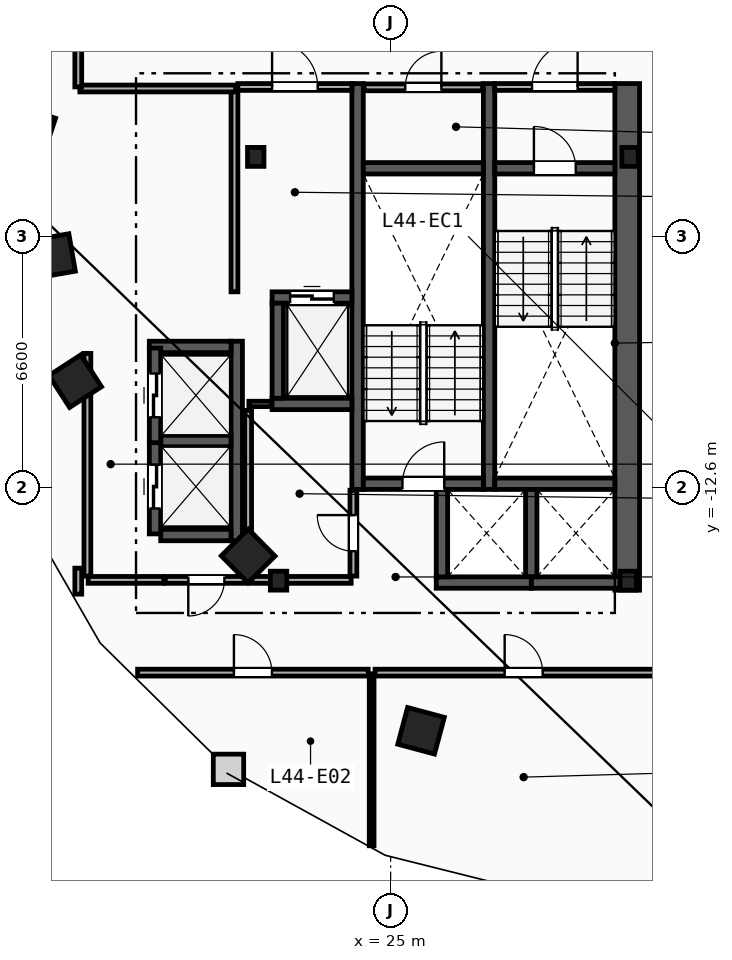
"""IFC4 building model, lengths in metres.
Left out: names, types, materials, properties, quantities, classifications, styles, units other than length and angle.
Written with IfcOpenShell. Run it as: python <this file> out.ifc"""

import sys

from ifc_helpers import new_model, si_unit, direction, frame, frame_2d, origin, origin_2d, place, context, subcontext, project, spatial, rectangle, i_section, extrude, element, fill, save


model = new_model("IFC4")
c1 = context("Model", 3, precision=1e-05, world=origin(), true_north=direction((0.0, 1.0)))
c2 = subcontext(c1, "Body", "Model", "MODEL_VIEW")
j1 = project(units=[si_unit("LENGTHUNIT", "METRE"), si_unit("PLANEANGLEUNIT", "RADIAN")], contexts=[c1])
p1 = place(None, origin())
s1 = spatial("IfcSite", under=j1, at=p1, CompositionType="ELEMENT")
p2 = place(p1, origin())
s2 = spatial("IfcBuilding", under=s1, at=p2, CompositionType="ELEMENT")
p3 = place(p2, frame((0.0, 0.0, 169.2)))
s3 = spatial("IfcBuildingStorey", under=s2, at=p3, CompositionType="ELEMENT", Elevation=169.2)
for number, where, z_axis, x_axis in (
    (1, (31.3, -3.9, 0.0), (0.0, 0.0, 1.0), (1.0, 0.0, 0.0)),
    (2, (21.45, -3.9, 0.0), (0.0, 0.0, 1.0), (1.0, 0.0, 0.0)),
    (3, (22.05, -15.05, 0.0), (0.0, 0.0, 1.0), (1.0, 0.0, 0.0)),
    (4, (31.25, -15.05, 0.0), (0.0, 0.0, 1.0), (1.0, 0.0, 0.0)),
):
    element("IfcColumn", number, at=place(p3, frame(where, z_axis=z_axis, x_axis=x_axis)), inside=s3, PredefinedType="COLUMN", context=c2, shape_type="SweptSolid", body=[
        extrude(i_section(OverallWidth=0.432, OverallDepth=0.498, WebThickness=0.056, FlangeThickness=0.089, FilletRadius=0.018, at=origin_2d()), origin(), (0.0, 0.0, 1.0), 3.6),
    ])
for number, where, z_axis, x_axis in (
    (5, (15.55, -3.2, 0.0), (0.0, 0.0, 1.0), (-0.315, -0.949, 0.0)),
    (6, (16.125, -6.5, 0.0), (0.0, 0.0, 1.0), (0.172, -0.985, 0.0)),
    (7, (16.7, -9.8, 0.0), (0.0, 0.0, 1.0), (0.544, -0.839, 0.0)),
    (8, (21.25, -14.4, 0.0), (0.0, 0.0, 1.0), (0.703, -0.711, 0.0)),
    (9, (25.8, -19.0, 0.0), (0.0, 0.0, 1.0), (0.966, -0.259, 0.0)),
):
    element("IfcColumn", number, at=place(p3, frame(where, z_axis=z_axis, x_axis=x_axis)), inside=s3, PredefinedType="COLUMN", context=c2, shape_type="SweptSolid", body=[
        extrude(rectangle(XDim=1.0, YDim=1.0, at=origin_2d()), origin(), (0.0, 0.0, 1.0), 3.6),
    ])
p4 = place(p3, frame((31.225, -15.3, 0.0), z_axis=(0.0, 0.0, 1.0), x_axis=(0.0, 1.0, 0.0)))
e10 = element("IfcWall", 10, at=p4, inside=s3, PredefinedType="SHEAR", context=c2, shape_type="SweptSolid", body=[
    extrude(rectangle(XDim=13.33, YDim=0.65, at=frame_2d((6.665, 0.0))), origin(), (0.0, 0.0, 1.0), 3.36),
])
for number, where, z_axis, x_axis in (
    (11, (27.59, -12.65, 0.0), (0.0, 0.0, 1.0), (0.0, 1.0, 0.0)),
    (12, (24.13, -12.65, 0.0), (0.0, 0.0, 1.0), (0.0, 1.0, 0.0)),
):
    element("IfcWall", number, at=place(p3, frame(where, z_axis=z_axis, x_axis=x_axis)), inside=s3, PredefinedType="SHEAR", context=c2, shape_type="SweptSolid", body=[
        extrude(rectangle(XDim=10.68, YDim=0.3, at=frame_2d((5.34, 0.0))), origin(), (0.0, 0.0, 1.0), 3.36),
    ])
p5 = place(p3, frame((27.74, -4.2, 0.0), z_axis=(0.0, 0.0, 1.0), x_axis=(1.0, 0.0, 0.0)))
e13 = element("IfcWall", 13, at=p5, inside=s3, PredefinedType="SHEAR", context=c2, shape_type="SweptSolid", body=[
    extrude(rectangle(XDim=3.16, YDim=0.3, at=frame_2d((1.58, 0.0))), origin(), (0.0, 0.0, 1.0), 3.36),
])
p6 = place(p5, frame((1.03, 0.0, 0.0)))
e14 = element("IfcOpeningElement", 14, at=p6, cuts=e13, PredefinedType="OPENING", context=c2, shape_type="SweptSolid", body=[
    extrude(rectangle(XDim=1.1, YDim=2.15, at=frame_2d((0.55, 1.075))), frame((0.0, 0.16, 0.0), z_axis=(0.0, -1.0, 0.0), x_axis=(1.0, 0.0, 0.0)), (0.0, 0.0, 1.0), 0.32),
])
p7 = place(p3, frame((27.74, -12.5, 0.0), z_axis=(0.0, 0.0, 1.0), x_axis=(1.0, 0.0, 0.0)))
e15 = element("IfcWall", 15, at=p7, inside=s3, PredefinedType="SHEAR", context=c2, shape_type="SweptSolid", body=[
    extrude(rectangle(XDim=3.16, YDim=0.3, at=frame_2d((1.58, 0.0))), origin(), (0.0, 0.0, 1.0), 3.36),
])
p8 = place(p3, frame((24.28, -12.5, 0.0), z_axis=(0.0, 0.0, 1.0), x_axis=(1.0, 0.0, 0.0)))
e16 = element("IfcWall", 16, at=p8, inside=s3, PredefinedType="SHEAR", context=c2, shape_type="SweptSolid", body=[
    extrude(rectangle(XDim=3.16, YDim=0.3, at=frame_2d((1.58, 0.0))), origin(), (0.0, 0.0, 1.0), 3.36),
])
p9 = place(p8, frame((1.03, 0.0, 0.0)))
e17 = element("IfcOpeningElement", 17, at=p9, cuts=e16, PredefinedType="OPENING", context=c2, shape_type="SweptSolid", body=[
    extrude(rectangle(XDim=1.1, YDim=2.15, at=frame_2d((0.55, 1.075))), frame((0.0, 0.16, 0.0), z_axis=(0.0, -1.0, 0.0), x_axis=(1.0, 0.0, 0.0)), (0.0, 0.0, 1.0), 0.32),
])
p10 = place(p3, frame((24.28, -4.2, 0.0), z_axis=(0.0, 0.0, 1.0), x_axis=(1.0, 0.0, 0.0)))
e18 = element("IfcWall", 18, at=p10, inside=s3, PredefinedType="SHEAR", context=c2, shape_type="SweptSolid", body=[
    extrude(rectangle(XDim=3.16, YDim=0.3, at=frame_2d((1.58, 0.0))), origin(), (0.0, 0.0, 1.0), 3.36),
])
p11 = place(p3, frame((20.89, -7.45, 0.0), z_axis=(0.0, 0.0, 1.0), x_axis=(0.0, 1.0, 0.0)))
e19 = element("IfcWall", 19, at=p11, inside=s3, PredefinedType="PARTITIONING", context=c2, shape_type="SweptSolid", body=[
    extrude(rectangle(XDim=5.3, YDim=0.18, at=frame_2d((2.65, 0.0))), origin(), (0.0, 0.0, 1.0), 3.36),
])
p12 = place(p3, frame((20.98, -2.06, 0.0), z_axis=(0.0, 0.0, 1.0), x_axis=(1.0, 0.0, 0.0)))
e20 = element("IfcWall", 20, at=p12, inside=s3, PredefinedType="PARTITIONING", context=c2, shape_type="SweptSolid", body=[
    extrude(rectangle(XDim=3.0, YDim=0.18, at=frame_2d((1.5, 0.0))), origin(), (0.0, 0.0, 1.0), 3.36),
])
p13 = place(p12, frame((0.9, 0.0, 0.0)))
e21 = element("IfcOpeningElement", 21, at=p13, cuts=e20, PredefinedType="OPENING", context=c2, shape_type="SweptSolid", body=[
    extrude(rectangle(XDim=1.2, YDim=2.15, at=frame_2d((0.6, 1.075))), frame((0.0, 0.1, 0.0), z_axis=(0.0, -1.0, 0.0), x_axis=(1.0, 0.0, 0.0)), (0.0, 0.0, 1.0), 0.2),
])
p14 = place(p3, frame((27.74, -2.06, 0.0), z_axis=(0.0, 0.0, 1.0), x_axis=(1.0, 0.0, 0.0)))
e22 = element("IfcWall", 22, at=p14, inside=s3, PredefinedType="PARTITIONING", context=c2, shape_type="SweptSolid", body=[
    extrude(rectangle(XDim=3.16, YDim=0.18, at=frame_2d((1.58, 0.0))), origin(), (0.0, 0.0, 1.0), 3.36),
])
p15 = place(p14, frame((0.98, 0.0, 0.0)))
e23 = element("IfcOpeningElement", 23, at=p15, cuts=e22, PredefinedType="OPENING", context=c2, shape_type="SweptSolid", body=[
    extrude(rectangle(XDim=1.2, YDim=2.15, at=frame_2d((0.6, 1.075))), frame((0.0, 0.1, 0.0), z_axis=(0.0, -1.0, 0.0), x_axis=(1.0, 0.0, 0.0)), (0.0, 0.0, 1.0), 0.2),
])
p16 = place(p3, frame((21.88, -7.6, 0.0), z_axis=(0.0, 0.0, 1.0), x_axis=(1.0, 0.0, 0.0)))
e24 = element("IfcWall", 24, at=p16, inside=s3, PredefinedType="SHEAR", context=c2, shape_type="SweptSolid", body=[
    extrude(rectangle(XDim=2.1, YDim=0.3, at=frame_2d((1.05, 0.0))), origin(), (0.0, 0.0, 1.0), 3.36),
])
p17 = place(p16, frame((0.475, 0.0, 0.0)))
e25 = element("IfcOpeningElement", 25, at=p17, cuts=e24, PredefinedType="OPENING", context=c2, shape_type="SweptSolid", body=[
    extrude(rectangle(XDim=1.15, YDim=2.2, at=frame_2d((0.575, 1.1))), frame((0.0, 0.16, 0.0), z_axis=(0.0, -1.0, 0.0), x_axis=(1.0, 0.0, 0.0)), (0.0, 0.0, 1.0), 0.32),
])
p18 = place(p3, frame((21.88, -10.4, 0.0), z_axis=(0.0, 0.0, 1.0), x_axis=(1.0, 0.0, 0.0)))
e26 = element("IfcWall", 26, at=p18, inside=s3, PredefinedType="SHEAR", context=c2, shape_type="SweptSolid", body=[
    extrude(rectangle(XDim=2.1, YDim=0.3, at=frame_2d((1.05, 0.0))), origin(), (0.0, 0.0, 1.0), 3.36),
])
for number, where, z_axis, x_axis in (
    (27, (22.03, -10.25, 0.0), (0.0, 0.0, 1.0), (0.0, 1.0, 0.0)),
    (28, (28.7, -15.1, 0.0), (0.0, 0.0, 1.0), (1.0, 0.0, 0.0)),
):
    element("IfcWall", number, at=place(p3, frame(where, z_axis=z_axis, x_axis=x_axis)), inside=s3, PredefinedType="SHEAR", context=c2, shape_type="SweptSolid", body=[
        extrude(rectangle(XDim=2.5, YDim=0.3, at=frame_2d((1.25, 0.0))), origin(), (0.0, 0.0, 1.0), 3.36),
    ])
p19 = place(p3, frame((28.7, -14.95, 0.0), z_axis=(0.0, 0.0, 1.0), x_axis=(0.0, 1.0, 0.0)))
e29 = element("IfcWall", 29, at=p19, inside=s3, PredefinedType="SHEAR", context=c2, shape_type="SweptSolid", body=[
    extrude(rectangle(XDim=2.3, YDim=0.3, at=frame_2d((1.15, 0.0))), origin(), (0.0, 0.0, 1.0), 3.36),
])
p20 = place(p3, frame((26.2, -15.1, 0.0), z_axis=(0.0, 0.0, 1.0), x_axis=(1.0, 0.0, 0.0)))
e30 = element("IfcWall", 30, at=p20, inside=s3, PredefinedType="SHEAR", context=c2, shape_type="SweptSolid", body=[
    extrude(rectangle(XDim=2.5, YDim=0.3, at=frame_2d((1.25, 0.0))), origin(), (0.0, 0.0, 1.0), 3.36),
])
p21 = place(p3, frame((26.35, -14.95, 0.0), z_axis=(0.0, 0.0, 1.0), x_axis=(0.0, 1.0, 0.0)))
e31 = element("IfcWall", 31, at=p21, inside=s3, PredefinedType="SHEAR", context=c2, shape_type="SweptSolid", body=[
    extrude(rectangle(XDim=2.3, YDim=0.3, at=frame_2d((1.15, 0.0))), origin(), (0.0, 0.0, 1.0), 3.36),
])
p22 = place(p3, frame((20.95, -14.0, 0.0), z_axis=(0.0, 0.0, 1.0), x_axis=(0.0, 1.0, 0.0)))
e32 = element("IfcWall", 32, at=p22, inside=s3, PredefinedType="SHEAR", context=c2, shape_type="SweptSolid", body=[
    extrude(rectangle(XDim=5.25, YDim=0.3, at=frame_2d((2.625, 0.0))), origin(), (0.0, 0.0, 1.0), 3.36),
])
p23 = place(p3, frame((18.95, -13.85, 0.0), z_axis=(0.0, 0.0, 1.0), x_axis=(1.0, 0.0, 0.0)))
e33 = element("IfcWall", 33, at=p23, inside=s3, PredefinedType="SHEAR", context=c2, shape_type="SweptSolid", body=[
    extrude(rectangle(XDim=1.85, YDim=0.3, at=frame_2d((0.925, 0.0))), origin(), (0.0, 0.0, 1.0), 3.36),
])
p24 = place(p3, frame((18.65, -8.9, 0.0), z_axis=(0.0, 0.0, 1.0), x_axis=(1.0, 0.0, 0.0)))
e34 = element("IfcWall", 34, at=p24, inside=s3, PredefinedType="SHEAR", context=c2, shape_type="SweptSolid", body=[
    extrude(rectangle(XDim=2.15, YDim=0.3, at=frame_2d((1.075, 0.0))), origin(), (0.0, 0.0, 1.0), 3.36),
])
p25 = place(p3, frame((18.95, -11.375, 0.0), z_axis=(0.0, 0.0, 1.0), x_axis=(1.0, 0.0, 0.0)))
e35 = element("IfcWall", 35, at=p25, inside=s3, PredefinedType="SHEAR", context=c2, shape_type="SweptSolid", body=[
    extrude(rectangle(XDim=1.85, YDim=0.3, at=frame_2d((0.925, 0.0))), origin(), (0.0, 0.0, 1.0), 3.36),
])
p26 = place(p3, frame((18.8, -13.82, 0.0), z_axis=(0.0, 0.0, 1.0), x_axis=(0.0, 1.0, 0.0)))
e36 = element("IfcWall", 36, at=p26, inside=s3, PredefinedType="SHEAR", context=c2, shape_type="SweptSolid", body=[
    extrude(rectangle(XDim=2.49, YDim=0.3, at=frame_2d((1.245, 0.0))), origin(), (0.0, 0.0, 1.0), 3.36),
])
p27 = place(p26, frame((0.67, 0.0, 0.0)))
e37 = element("IfcOpeningElement", 37, at=p27, cuts=e36, PredefinedType="OPENING", context=c2, shape_type="SweptSolid", body=[
    extrude(rectangle(XDim=1.15, YDim=2.2, at=frame_2d((0.575, 1.1))), frame((0.0, 0.16, 0.0), z_axis=(0.0, -1.0, 0.0), x_axis=(1.0, 0.0, 0.0)), (0.0, 0.0, 1.0), 0.32),
])
p28 = place(p3, frame((18.8, -11.42, 0.0), z_axis=(0.0, 0.0, 1.0), x_axis=(0.0, 1.0, 0.0)))
e38 = element("IfcWall", 38, at=p28, inside=s3, PredefinedType="SHEAR", context=c2, shape_type="SweptSolid", body=[
    extrude(rectangle(XDim=2.49, YDim=0.3, at=frame_2d((1.245, 0.0))), origin(), (0.0, 0.0, 1.0), 3.36),
])
p29 = place(p28, frame((0.67, 0.0, 0.0)))
e39 = element("IfcOpeningElement", 39, at=p29, cuts=e38, PredefinedType="OPENING", context=c2, shape_type="SweptSolid", body=[
    extrude(rectangle(XDim=1.15, YDim=2.2, at=frame_2d((0.575, 1.1))), frame((0.0, 0.16, 0.0), z_axis=(0.0, -1.0, 0.0), x_axis=(1.0, 0.0, 0.0)), (0.0, 0.0, 1.0), 0.32),
])
p30 = place(p3, frame((17.02, -14.93, 0.0), z_axis=(0.0, 0.0, 1.0), x_axis=(0.0, 1.0, 0.0)))
e40 = element("IfcWall", 40, at=p30, inside=s3, PredefinedType="PARTITIONING", context=c2, shape_type="SweptSolid", body=[
    extrude(rectangle(XDim=5.86, YDim=0.18, at=frame_2d((2.93, 0.0))), origin(), (0.0, 0.0, 1.0), 3.36),
])
p31 = place(p3, frame((17.04, -15.03, 0.0), z_axis=(0.0, 0.0, 1.0), x_axis=(1.0, 0.0, 0.0)))
e41 = element("IfcWall", 41, at=p31, inside=s3, PredefinedType="PARTITIONING", context=c2, shape_type="SweptSolid", body=[
    extrude(rectangle(XDim=1.99, YDim=0.18, at=frame_2d((0.995, 0.0))), origin(), (0.0, 0.0, 1.0), 3.36),
])
p32 = place(p3, frame((21.23, -15.03, 0.0), z_axis=(0.0, 0.0, 1.0), x_axis=(-1.0, 0.0, 0.0)))
e42 = element("IfcWall", 42, at=p32, inside=s3, PredefinedType="PARTITIONING", context=c2, shape_type="SweptSolid", body=[
    extrude(rectangle(XDim=2.16, YDim=0.18, at=frame_2d((1.08, 0.0))), origin(), (0.0, 0.0, 1.0), 3.36),
])
p33 = place(p32, frame((0.605, 0.0, 0.0)))
e43 = element("IfcOpeningElement", 43, at=p33, cuts=e42, PredefinedType="OPENING", context=c2, shape_type="SweptSolid", body=[
    extrude(rectangle(XDim=0.95, YDim=2.1, at=frame_2d((0.475, 1.05))), frame((0.0, 0.1, 0.0), z_axis=(0.0, -1.0, 0.0), x_axis=(1.0, 0.0, 0.0)), (0.0, 0.0, 1.0), 0.2),
])
p34 = place(p3, frame((21.27, -10.4, 0.0), z_axis=(0.0, 0.0, 1.0), x_axis=(1.0, 0.0, 0.0)))
e44 = element("IfcWall", 44, at=p34, inside=s3, PredefinedType="PARTITIONING", context=c2, shape_type="SweptSolid", body=[
    extrude(rectangle(XDim=0.59, YDim=0.14, at=frame_2d((0.295, 0.0))), origin(), (0.0, 0.0, 1.0), 3.36),
])
p35 = place(p3, frame((21.25, -14.93, 0.0), z_axis=(0.0, 0.0, 1.0), x_axis=(0.0, 1.0, 0.0)))
e45 = element("IfcWall", 45, at=p35, inside=s3, PredefinedType="PARTITIONING", context=c2, shape_type="SweptSolid", body=[
    extrude(rectangle(XDim=4.36, YDim=0.18, at=frame_2d((2.18, 0.0))), origin(), (0.0, 0.0, 1.0), 3.36),
])
p36 = place(p3, frame((21.35, -15.03, 0.0), z_axis=(0.0, 0.0, 1.0), x_axis=(1.0, 0.0, 0.0)))
e46 = element("IfcWall", 46, at=p36, inside=s3, PredefinedType="PARTITIONING", context=c2, shape_type="SweptSolid", body=[
    extrude(rectangle(XDim=2.61, YDim=0.18, at=frame_2d((1.305, 0.0))), origin(), (0.0, 0.0, 1.0), 2.433),
])
p37 = place(p3, frame((24.3, -2.07, 0.0), z_axis=(0.0, 0.0, 1.0), x_axis=(1.0, 0.0, 0.0)))
e47 = element("IfcWall", 47, at=p37, inside=s3, PredefinedType="PARTITIONING", context=c2, shape_type="SweptSolid", body=[
    extrude(rectangle(XDim=3.12, YDim=0.18, at=frame_2d((1.56, 0.0))), origin(), (0.0, 0.0, 1.0), 3.36),
])
p38 = place(p37, frame((1.085, 0.0, 0.0)))
e48 = element("IfcOpeningElement", 48, at=p38, cuts=e47, PredefinedType="OPENING", context=c2, shape_type="SweptSolid", body=[
    extrude(rectangle(XDim=0.95, YDim=2.1, at=frame_2d((0.475, 1.05))), frame((0.0, 0.1, 0.0), z_axis=(0.0, -1.0, 0.0), x_axis=(1.0, 0.0, 0.0)), (0.0, 0.0, 1.0), 0.2),
])
p39 = place(p3, frame((24.02, -14.93, 0.0), z_axis=(0.0, 0.0, 1.0), x_axis=(0.0, 1.0, 0.0)))
e49 = element("IfcWall", 49, at=p39, inside=s3, PredefinedType="PARTITIONING", context=c2, shape_type="SweptSolid", body=[
    extrude(rectangle(XDim=2.26, YDim=0.18, at=frame_2d((1.13, 0.0))), origin(), (0.0, 0.0, 1.0), 3.36),
])
p40 = place(p39, frame((0.655, 0.0, 0.0)))
e50 = element("IfcOpeningElement", 50, at=p40, cuts=e49, PredefinedType="OPENING", context=c2, shape_type="SweptSolid", body=[
    extrude(rectangle(XDim=0.95, YDim=2.1, at=frame_2d((0.475, 1.05))), frame((0.0, 0.1, 0.0), z_axis=(0.0, -1.0, 0.0), x_axis=(1.0, 0.0, 0.0)), (0.0, 0.0, 1.0), 0.2),
])
p41 = place(p3, frame((24.5, -22.025, 0.0), z_axis=(0.0, 0.0, 1.0), x_axis=(0.0, 1.0, 0.0)))
e51 = element("IfcWall", 51, at=p41, inside=s3, PredefinedType="PARTITIONING", context=c2, shape_type="SweptSolid", body=[
    extrude(rectangle(XDim=4.525, YDim=0.125, at=frame_2d((2.263, 0.0))), origin(), (0.0, 0.0, 1.0), 3.36),
])
p42 = place(p3, frame((24.59, -17.47, 0.0), z_axis=(0.0, 0.0, 1.0), x_axis=(1.0, 0.0, 0.0)))
e52 = element("IfcWall", 52, at=p42, inside=s3, PredefinedType="PARTITIONING", context=c2, shape_type="SweptSolid", body=[
    extrude(rectangle(XDim=7.82, YDim=0.18, at=frame_2d((3.91, 0.0))), origin(), (0.0, 0.0, 1.0), 3.36),
])
p43 = place(p42, frame((3.41, 0.0, 0.0)))
e53 = element("IfcOpeningElement", 53, at=p43, cuts=e52, PredefinedType="OPENING", context=c2, shape_type="SweptSolid", body=[
    extrude(rectangle(XDim=1.0, YDim=2.15, at=frame_2d((0.5, 1.075))), frame((0.0, 0.1, 0.0), z_axis=(0.0, -1.0, 0.0), x_axis=(1.0, 0.0, 0.0)), (0.0, 0.0, 1.0), 0.2),
])
p44 = place(p3, frame((18.342, -17.47, 0.0), z_axis=(0.0, 0.0, 1.0), x_axis=(1.0, 0.0, 0.0)))
e54 = element("IfcWall", 54, at=p44, inside=s3, PredefinedType="PARTITIONING", context=c2, shape_type="SweptSolid", body=[
    extrude(rectangle(XDim=6.068, YDim=0.18, at=frame_2d((3.034, 0.0))), origin(), (0.0, 0.0, 1.0), 3.36),
])
p45 = place(p44, frame((2.534, 0.0, 0.0)))
e55 = element("IfcOpeningElement", 55, at=p45, cuts=e54, PredefinedType="OPENING", context=c2, shape_type="SweptSolid", body=[
    extrude(rectangle(XDim=1.0, YDim=2.15, at=frame_2d((0.5, 1.075))), frame((0.0, 0.1, 0.0), z_axis=(0.0, -1.0, 0.0), x_axis=(1.0, 0.0, 0.0)), (0.0, 0.0, 1.0), 0.2),
])
p46 = place(p3, frame((16.822, -2.1, 0.0), z_axis=(0.0, 0.0, 1.0), x_axis=(1.0, 0.0, 0.0)))
e56 = element("IfcWall", 56, at=p46, inside=s3, PredefinedType="PARTITIONING", context=c2, shape_type="SweptSolid", body=[
    extrude(rectangle(XDim=4.098, YDim=0.18, at=frame_2d((2.049, 0.0))), origin(), (0.0, 0.0, 1.0), 3.36),
])
p47 = place(p3, frame((16.78, 0.329, 0.0), z_axis=(0.0, 0.0, 1.0), x_axis=(0.0, -1.0, 0.0)))
e57 = element("IfcWall", 57, at=p47, inside=s3, PredefinedType="PARTITIONING", context=c2, shape_type="SweptSolid", body=[
    extrude(rectangle(XDim=2.387, YDim=0.18, at=frame_2d((1.194, 0.0))), origin(), (0.0, 0.0, 1.0), 3.36),
])
p48 = place(p3, frame((16.78, -14.721, 0.0), z_axis=(0.0, 0.0, 1.0), x_axis=(0.0, -1.0, 0.0)))
e58 = element("IfcWall", 58, at=p48, inside=s3, PredefinedType="PARTITIONING", context=c2, shape_type="SweptSolid", body=[
    extrude(rectangle(XDim=0.684, YDim=0.18, at=frame_2d((0.342, 0.0))), origin(), (0.0, 0.0, 1.0), 3.36),
])
p49 = place(p6, origin())
e59 = element("IfcDoor", 59, at=p49, inside=s3, OperationType="SINGLE_SWING_LEFT", PredefinedType="DOOR", context=c2, shape_type="SweptSolid", body=[
    extrude(rectangle(XDim=1.1, YDim=2.15, at=frame_2d((0.55, 1.075))), frame((0.0, 0.025, 0.0), z_axis=(0.0, -1.0, 0.0), x_axis=(1.0, 0.0, 0.0)), (0.0, 0.0, 1.0), 0.05),
])
fill(e14, e59)
p50 = place(p9, origin())
e60 = element("IfcDoor", 60, at=p50, inside=s3, OperationType="SINGLE_SWING_RIGHT", PredefinedType="DOOR", context=c2, shape_type="SweptSolid", body=[
    extrude(rectangle(XDim=1.1, YDim=2.15, at=frame_2d((0.55, 1.075))), frame((0.0, 0.025, 0.0), z_axis=(0.0, -1.0, 0.0), x_axis=(1.0, 0.0, 0.0)), (0.0, 0.0, 1.0), 0.05),
])
fill(e17, e60)
p51 = place(p13, origin())
e61 = element("IfcDoor", 61, at=p51, inside=s3, OperationType="SINGLE_SWING_LEFT", PredefinedType="DOOR", context=c2, shape_type="SweptSolid", body=[
    extrude(rectangle(XDim=1.2, YDim=2.15, at=frame_2d((0.6, 1.075))), frame((0.0, 0.025, 0.0), z_axis=(0.0, -1.0, 0.0), x_axis=(1.0, 0.0, 0.0)), (0.0, 0.0, 1.0), 0.05),
])
fill(e21, e61)
p52 = place(p15, origin())
e62 = element("IfcDoor", 62, at=p52, inside=s3, OperationType="SINGLE_SWING_RIGHT", PredefinedType="DOOR", context=c2, shape_type="SweptSolid", body=[
    extrude(rectangle(XDim=1.2, YDim=2.15, at=frame_2d((0.6, 1.075))), frame((0.0, 0.025, 0.0), z_axis=(0.0, -1.0, 0.0), x_axis=(1.0, 0.0, 0.0)), (0.0, 0.0, 1.0), 0.05),
])
fill(e23, e62)
p53 = place(p17, origin())
e63 = element("IfcDoor", 63, at=p53, inside=s3, OperationType="SLIDING_TO_LEFT", PredefinedType="TRAPDOOR", context=c2, shape_type="SweptSolid", body=[
    extrude(rectangle(XDim=1.15, YDim=2.2, at=frame_2d((0.575, 1.1))), frame((0.0, 0.025, 0.0), z_axis=(0.0, -1.0, 0.0), x_axis=(1.0, 0.0, 0.0)), (0.0, 0.0, 1.0), 0.05),
])
fill(e25, e63)
p54 = place(p27, origin())
e64 = element("IfcDoor", 64, at=p54, inside=s3, OperationType="SLIDING_TO_LEFT", PredefinedType="TRAPDOOR", context=c2, shape_type="SweptSolid", body=[
    extrude(rectangle(XDim=1.15, YDim=2.2, at=frame_2d((0.575, 1.1))), frame((0.0, 0.025, 0.0), z_axis=(0.0, -1.0, 0.0), x_axis=(1.0, 0.0, 0.0)), (0.0, 0.0, 1.0), 0.05),
])
fill(e37, e64)
p55 = place(p29, origin())
e65 = element("IfcDoor", 65, at=p55, inside=s3, OperationType="SLIDING_TO_LEFT", PredefinedType="TRAPDOOR", context=c2, shape_type="SweptSolid", body=[
    extrude(rectangle(XDim=1.15, YDim=2.2, at=frame_2d((0.575, 1.1))), frame((0.0, 0.025, 0.0), z_axis=(0.0, -1.0, 0.0), x_axis=(1.0, 0.0, 0.0)), (0.0, 0.0, 1.0), 0.05),
])
fill(e39, e65)
p56 = place(p43, origin())
e66 = element("IfcDoor", 66, at=p56, inside=s3, OperationType="SINGLE_SWING_LEFT", PredefinedType="DOOR", context=c2, shape_type="SweptSolid", body=[
    extrude(rectangle(XDim=1.0, YDim=2.15, at=frame_2d((0.5, 1.075))), frame((0.0, 0.025, 0.0), z_axis=(0.0, -1.0, 0.0), x_axis=(1.0, 0.0, 0.0)), (0.0, 0.0, 1.0), 0.05),
])
fill(e53, e66)
p57 = place(p45, origin())
e67 = element("IfcDoor", 67, at=p57, inside=s3, OperationType="SINGLE_SWING_LEFT", PredefinedType="DOOR", context=c2, shape_type="SweptSolid", body=[
    extrude(rectangle(XDim=1.0, YDim=2.15, at=frame_2d((0.5, 1.075))), frame((0.0, 0.025, 0.0), z_axis=(0.0, -1.0, 0.0), x_axis=(1.0, 0.0, 0.0)), (0.0, 0.0, 1.0), 0.05),
])
fill(e55, e67)
p58 = place(p38, origin())
e68 = element("IfcDoor", 68, at=p58, inside=s3, OperationType="SINGLE_SWING_RIGHT", PredefinedType="DOOR", context=c2, shape_type="SweptSolid", body=[
    extrude(rectangle(XDim=0.95, YDim=2.1, at=frame_2d((0.475, 1.05))), frame((0.0, 0.025, 0.0), z_axis=(0.0, -1.0, 0.0), x_axis=(1.0, 0.0, 0.0)), (0.0, 0.0, 1.0), 0.05),
])
fill(e48, e68)
p59 = place(p40, origin())
e69 = element("IfcDoor", 69, at=p59, inside=s3, OperationType="SINGLE_SWING_RIGHT", PredefinedType="DOOR", context=c2, shape_type="SweptSolid", body=[
    extrude(rectangle(XDim=0.95, YDim=2.1, at=frame_2d((0.475, 1.05))), frame((0.0, 0.025, 0.0), z_axis=(0.0, -1.0, 0.0), x_axis=(1.0, 0.0, 0.0)), (0.0, 0.0, 1.0), 0.05),
])
fill(e50, e69)
p60 = place(p33, origin())
e70 = element("IfcDoor", 70, at=p60, inside=s3, OperationType="SINGLE_SWING_RIGHT", PredefinedType="DOOR", context=c2, shape_type="SweptSolid", body=[
    extrude(rectangle(XDim=0.95, YDim=2.1, at=frame_2d((0.475, 1.05))), frame((0.0, 0.025, 0.0), z_axis=(0.0, -1.0, 0.0), x_axis=(1.0, 0.0, 0.0)), (0.0, 0.0, 1.0), 0.05),
])
fill(e43, e70)
save(model, sys.argv[1])
